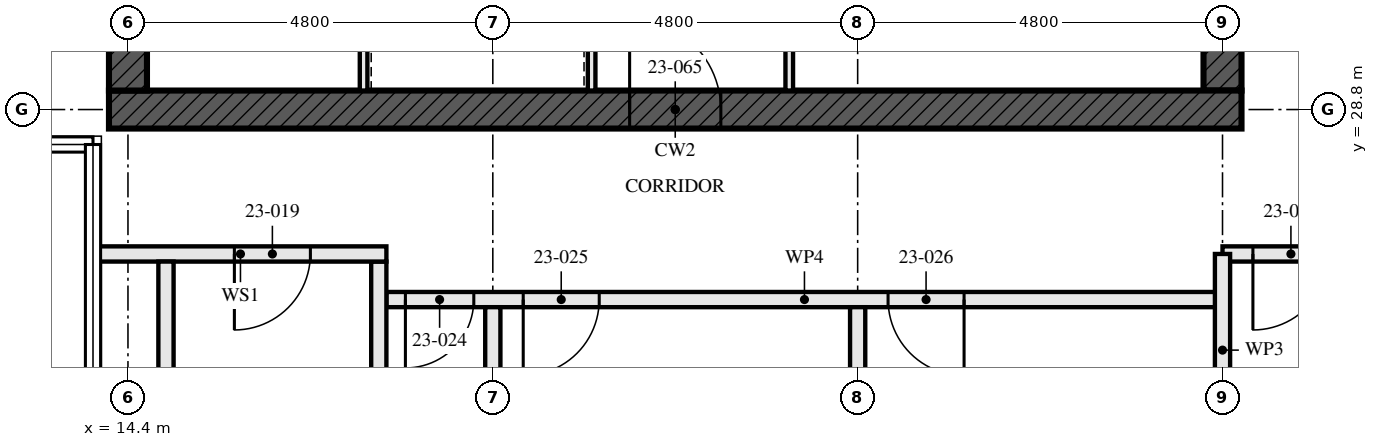
"""IFC4 building model, lengths in metres.
Left out: names, types, materials, properties, quantities, classifications, styles, units other than length and angle.
Written with IfcOpenShell. Run it as: python <this file> out.ifc"""

import sys

from ifc_helpers import new_model, si_unit, direction, frame, frame_2d, origin, place, context, subcontext, project, spatial, rectangle, extrude, element, fill, save


model = new_model("IFC4")
c1 = context("Model", 3, precision=1e-05, world=origin(), true_north=direction((0.0, 1.0)))
c2 = subcontext(c1, "Body", "Model", "MODEL_VIEW")
j1 = project(units=[si_unit("LENGTHUNIT", "METRE"), si_unit("PLANEANGLEUNIT", "RADIAN")], contexts=[c1])
p1 = place(None, origin())
s1 = spatial("IfcSite", under=j1, at=p1, CompositionType="ELEMENT")
p2 = place(p1, origin())
s2 = spatial("IfcBuilding", under=s1, at=p2, CompositionType="ELEMENT")
p3 = place(p2, frame((0.0, 0.0, 87.5)))
s3 = spatial("IfcBuildingStorey", under=s2, at=p3, CompositionType="ELEMENT", Elevation=87.5)
p4 = place(p3, frame((14.15, 28.8, -0.17), z_axis=(0.0, 0.0, 1.0), x_axis=(1.0, 0.0, 0.0)))
e1 = element("IfcWall", 1, at=p4, inside=s3, PredefinedType="SHEAR", context=c2, shape_type="SweptSolid", body=[
    extrude(rectangle(XDim=14.9, YDim=0.5, at=frame_2d((7.45, 0.0))), origin(), (0.0, 0.0, 1.0), 3.5),
])
p5 = place(p4, frame((6.85, 0.0, 0.17)))
e2 = element("IfcOpeningElement", 2, at=p5, cuts=e1, PredefinedType="OPENING", context=c2, shape_type="SweptSolid", body=[
    extrude(rectangle(XDim=1.2, YDim=2.1, at=frame_2d((0.6, 1.05))), frame((0.0, 0.26, 0.0), z_axis=(0.0, -1.0, 0.0), x_axis=(1.0, 0.0, 0.0)), (0.0, 0.0, 1.0), 0.521),
])
p6 = place(p3, frame((14.4, 42.95, -0.17), z_axis=(0.0, 0.0, 1.0), x_axis=(0.0, -1.0, 0.0)))
e3 = element("IfcWall", 3, at=p6, inside=s3, PredefinedType="SHEAR", context=c2, shape_type="SweptSolid", body=[
    extrude(rectangle(XDim=13.9, YDim=0.5, at=frame_2d((6.95, 0.0))), origin(), (0.0, 0.0, 1.0), 3.5),
])
p7 = place(p6, frame((6.35, 0.0, 0.17)))
e4 = element("IfcOpeningElement", 4, at=p7, cuts=e3, PredefinedType="OPENING", context=c2, shape_type="SweptSolid", body=[
    extrude(rectangle(XDim=1.2, YDim=2.1, at=frame_2d((0.6, 1.05))), frame((0.0, 0.26, 0.0), z_axis=(0.0, -1.0, 0.0), x_axis=(1.0, 0.0, 0.0)), (0.0, 0.0, 1.0), 0.521),
])
p8 = place(p3, frame((28.8, 29.05, -0.17), z_axis=(0.0, 0.0, 1.0), x_axis=(0.0, 1.0, 0.0)))
e5 = element("IfcWall", 5, at=p8, inside=s3, PredefinedType="SHEAR", context=c2, shape_type="SweptSolid", body=[
    extrude(rectangle(XDim=13.9, YDim=0.5, at=frame_2d((6.95, 0.0))), origin(), (0.0, 0.0, 1.0), 3.5),
])
p9 = place(p8, frame((6.35, 0.0, 0.17)))
e6 = element("IfcOpeningElement", 6, at=p9, cuts=e5, PredefinedType="OPENING", context=c2, shape_type="SweptSolid", body=[
    extrude(rectangle(XDim=1.2, YDim=2.1, at=frame_2d((0.6, 1.05))), frame((0.0, 0.26, 0.0), z_axis=(0.0, -1.0, 0.0), x_axis=(1.0, 0.0, 0.0)), (0.0, 0.0, 1.0), 0.521),
])
for number, where, z_axis, x_axis in (
    (7, (14.9, 22.1, 0.0), (0.0, 0.0, 1.0), (0.0, 1.0, 0.0)),
    (8, (17.7, 22.1, 0.0), (0.0, 0.0, 1.0), (0.0, 1.0, 0.0)),
):
    element("IfcWall", number, at=place(p3, frame(where, z_axis=z_axis, x_axis=x_axis)), inside=s3, PredefinedType="SOLIDWALL", context=c2, shape_type="SweptSolid", body=[
        extrude(rectangle(XDim=4.7, YDim=0.2, at=frame_2d((2.35, 0.0))), origin(), (0.0, 0.0, 1.0), 2.99),
    ])
p10 = place(p3, frame((13.96, 26.9, 0.0), z_axis=(0.0, 0.0, 1.0), x_axis=(1.0, 0.0, 0.0)))
e9 = element("IfcWall", 9, at=p10, inside=s3, PredefinedType="SOLIDWALL", context=c2, shape_type="SweptSolid", body=[
    extrude(rectangle(XDim=3.84, YDim=0.2, at=frame_2d((1.92, 0.0))), origin(), (0.0, 0.0, 1.0), 2.32),
])
p11 = place(p10, frame((1.84, 0.0, 0.0)))
e10 = element("IfcOpeningElement", 10, at=p11, cuts=e9, PredefinedType="OPENING", context=c2, shape_type="SweptSolid", body=[
    extrude(rectangle(XDim=1.0, YDim=2.1, at=frame_2d((0.5, 1.05))), frame((0.0, 0.111, 0.0), z_axis=(0.0, -1.0, 0.0), x_axis=(1.0, 0.0, 0.0)), (0.0, 0.0, 1.0), 0.221),
])
p12 = place(p3, frame((19.2, 19.545, 0.0), z_axis=(0.0, 0.0, 1.0), x_axis=(0.0, 1.0, 0.0)))
e11 = element("IfcWall", 11, at=p12, inside=s3, PredefinedType="PARTITIONING", context=c2, shape_type="SweptSolid", body=[
    extrude(rectangle(XDim=6.655, YDim=0.2, at=frame_2d((3.328, 0.0))), origin(), (0.0, 0.0, 1.0), 2.55),
])
p13 = place(p3, frame((24.0, 14.745, 0.0), z_axis=(0.0, 0.0, 1.0), x_axis=(0.0, 1.0, 0.0)))
e12 = element("IfcWall", 12, at=p13, inside=s3, PredefinedType="PARTITIONING", context=c2, shape_type="SweptSolid", body=[
    extrude(rectangle(XDim=11.455, YDim=0.2, at=frame_2d((5.728, 0.0))), origin(), (0.0, 0.0, 1.0), 2.55),
])
p14 = place(p3, frame((17.8, 26.3, 0.0), z_axis=(0.0, 0.0, 1.0), x_axis=(1.0, 0.0, 0.0)))
e13 = element("IfcWall", 13, at=p14, inside=s3, PredefinedType="PARTITIONING", context=c2, shape_type="SweptSolid", body=[
    extrude(rectangle(XDim=11.0, YDim=0.2, at=frame_2d((5.5, 0.0))), origin(), (0.0, 0.0, 1.0), 2.55),
])
p15 = place(p14, frame((0.25, 0.0, 0.0)))
e14 = element("IfcOpeningElement", 14, at=p15, cuts=e13, PredefinedType="OPENING", context=c2, shape_type="SweptSolid", body=[
    extrude(rectangle(XDim=0.9, YDim=2.1, at=frame_2d((0.45, 1.05))), frame((0.0, 0.111, 0.0), z_axis=(0.0, -1.0, 0.0), x_axis=(1.0, 0.0, 0.0)), (0.0, 0.0, 1.0), 0.221),
])
p16 = place(p14, frame((1.8, 0.0, 0.0)))
e15 = element("IfcOpeningElement", 15, at=p16, cuts=e13, PredefinedType="OPENING", context=c2, shape_type="SweptSolid", body=[
    extrude(rectangle(XDim=1.0, YDim=2.1, at=frame_2d((0.5, 1.05))), frame((0.0, 0.111, 0.0), z_axis=(0.0, -1.0, 0.0), x_axis=(1.0, 0.0, 0.0)), (0.0, 0.0, 1.0), 0.221),
])
p17 = place(p14, frame((6.6, 0.0, 0.0)))
e16 = element("IfcOpeningElement", 16, at=p17, cuts=e13, PredefinedType="OPENING", context=c2, shape_type="SweptSolid", body=[
    extrude(rectangle(XDim=1.0, YDim=2.1, at=frame_2d((0.5, 1.05))), frame((0.0, 0.111, 0.0), z_axis=(0.0, -1.0, 0.0), x_axis=(1.0, 0.0, 0.0)), (0.0, 0.0, 1.0), 0.221),
])
p18 = place(p3, frame((28.8, 26.9, 0.0), z_axis=(0.0, 0.0, 1.0), x_axis=(1.0, 0.0, 0.0)))
e17 = element("IfcWall", 17, at=p18, inside=s3, PredefinedType="PARTITIONING", context=c2, shape_type="SweptSolid", body=[
    extrude(rectangle(XDim=9.6, YDim=0.2, at=frame_2d((4.8, 0.0))), origin(), (0.0, 0.0, 1.0), 3.33),
])
p19 = place(p18, frame((0.4, 0.0, 0.0)))
e18 = element("IfcOpeningElement", 18, at=p19, cuts=e17, PredefinedType="OPENING", context=c2, shape_type="SweptSolid", body=[
    extrude(rectangle(XDim=1.0, YDim=2.1, at=frame_2d((0.5, 1.05))), frame((0.0, 0.111, 0.0), z_axis=(0.0, -1.0, 0.0), x_axis=(1.0, 0.0, 0.0)), (0.0, 0.0, 1.0), 0.221),
])
p20 = place(p18, frame((5.2, 0.0, 0.0)))
e19 = element("IfcOpeningElement", 19, at=p20, cuts=e17, PredefinedType="OPENING", context=c2, shape_type="SweptSolid", body=[
    extrude(rectangle(XDim=1.0, YDim=2.1, at=frame_2d((0.5, 1.05))), frame((0.0, 0.111, 0.0), z_axis=(0.0, -1.0, 0.0), x_axis=(1.0, 0.0, 0.0)), (0.0, 0.0, 1.0), 0.221),
])
p21 = place(p3, frame((20.5, 29.05, 0.0), z_axis=(0.0, 0.0, 1.0), x_axis=(0.0, 1.0, 0.0)))
e20 = element("IfcWall", 20, at=p21, inside=s3, PredefinedType="SOLIDWALL", context=c2, shape_type="SweptSolid", body=[
    extrude(rectangle(XDim=5.8, YDim=0.1, at=frame_2d((2.9, 0.0))), origin(), (0.0, 0.0, 1.0), 3.33),
])
p22 = place(p21, frame((0.8, 0.0, 0.0)))
e21 = element("IfcOpeningElement", 21, at=p22, cuts=e20, PredefinedType="OPENING", context=c2, shape_type="SweptSolid", body=[
    extrude(rectangle(XDim=1.1, YDim=2.3, at=frame_2d((0.55, 1.15))), frame((0.0, 0.061, 0.0), z_axis=(0.0, -1.0, 0.0), x_axis=(1.0, 0.0, 0.0)), (0.0, 0.0, 1.0), 0.121),
])
p23 = place(p21, frame((3.775, 0.0, 0.0)))
e22 = element("IfcOpeningElement", 22, at=p23, cuts=e20, PredefinedType="OPENING", context=c2, shape_type="SweptSolid", body=[
    extrude(rectangle(XDim=1.1, YDim=2.3, at=frame_2d((0.55, 1.15))), frame((0.0, 0.061, 0.0), z_axis=(0.0, -1.0, 0.0), x_axis=(1.0, 0.0, 0.0)), (0.0, 0.0, 1.0), 0.121),
])
p24 = place(p3, frame((23.1, 29.05, 0.0), z_axis=(0.0, 0.0, 1.0), x_axis=(0.0, 1.0, 0.0)))
e23 = element("IfcWall", 23, at=p24, inside=s3, PredefinedType="SOLIDWALL", context=c2, shape_type="SweptSolid", body=[
    extrude(rectangle(XDim=5.8, YDim=0.1, at=frame_2d((2.9, 0.0))), origin(), (0.0, 0.0, 1.0), 3.33),
])
p25 = place(p24, frame((1.0, 0.0, 0.0)))
e24 = element("IfcOpeningElement", 24, at=p25, cuts=e23, PredefinedType="OPENING", context=c2, shape_type="SweptSolid", body=[
    extrude(rectangle(XDim=0.7, YDim=2.1, at=frame_2d((0.35, 1.05))), frame((0.0, 0.061, 0.0), z_axis=(0.0, -1.0, 0.0), x_axis=(1.0, 0.0, 0.0)), (0.0, 0.0, 1.0), 0.121),
])
p26 = place(p3, frame((17.5, 29.05, 0.0), z_axis=(0.0, 0.0, 1.0), x_axis=(0.0, 1.0, 0.0)))
e25 = element("IfcWall", 25, at=p26, inside=s3, PredefinedType="SOLIDWALL", context=c2, shape_type="SweptSolid", body=[
    extrude(rectangle(XDim=5.8, YDim=0.1, at=frame_2d((2.9, 0.0))), origin(), (0.0, 0.0, 1.0), 3.33),
])
p27 = place(p3, frame((28.8, 24.37, 0.0), z_axis=(0.0, 0.0, 1.0), x_axis=(0.0, 1.0, 0.0)))
e26 = element("IfcWall", 26, at=p27, inside=s3, PredefinedType="PARTITIONING", context=c2, shape_type="SweptSolid", body=[
    extrude(rectangle(XDim=2.53, YDim=0.2, at=frame_2d((1.265, 0.0))), origin(), (0.0, 0.0, 1.0), 2.32),
])
p28 = place(p11, frame((1.0, 0.0, 0.0), z_axis=(0.0, 0.0, 1.0), x_axis=(-1.0, 0.0, 0.0)))
e27 = element("IfcDoor", 27, at=p28, inside=s3, OperationType="SINGLE_SWING_LEFT", PredefinedType="DOOR", context=c2, shape_type="SweptSolid", body=[
    extrude(rectangle(XDim=1.0, YDim=2.1, at=frame_2d((0.5, 1.05))), frame((0.0, 0.032, 0.0), z_axis=(0.0, -1.0, 0.0), x_axis=(1.0, 0.0, 0.0)), (0.0, 0.0, 1.0), 0.064),
])
fill(e10, e27)
p29 = place(p15, frame((0.9, 0.0, 0.0), z_axis=(0.0, 0.0, 1.0), x_axis=(-1.0, 0.0, 0.0)))
e28 = element("IfcDoor", 28, at=p29, inside=s3, OperationType="SINGLE_SWING_LEFT", PredefinedType="DOOR", context=c2, shape_type="SweptSolid", body=[
    extrude(rectangle(XDim=0.9, YDim=2.1, at=frame_2d((0.45, 1.05))), frame((0.0, 0.027, 0.0), z_axis=(0.0, -1.0, 0.0), x_axis=(1.0, 0.0, 0.0)), (0.0, 0.0, 1.0), 0.054),
])
fill(e14, e28)
p30 = place(p16, frame((1.0, 0.0, 0.0), z_axis=(0.0, 0.0, 1.0), x_axis=(-1.0, 0.0, 0.0)))
e29 = element("IfcDoor", 29, at=p30, inside=s3, OperationType="SINGLE_SWING_LEFT", PredefinedType="DOOR", context=c2, shape_type="SweptSolid", body=[
    extrude(rectangle(XDim=1.0, YDim=2.1, at=frame_2d((0.5, 1.05))), frame((0.0, 0.027, 0.0), z_axis=(0.0, -1.0, 0.0), x_axis=(1.0, 0.0, 0.0)), (0.0, 0.0, 1.0), 0.054),
])
fill(e15, e29)
p31 = place(p17, frame((1.0, 0.0, 0.0), z_axis=(0.0, 0.0, 1.0), x_axis=(-1.0, 0.0, 0.0)))
e30 = element("IfcDoor", 30, at=p31, inside=s3, OperationType="SINGLE_SWING_RIGHT", PredefinedType="DOOR", context=c2, shape_type="SweptSolid", body=[
    extrude(rectangle(XDim=1.0, YDim=2.1, at=frame_2d((0.5, 1.05))), frame((0.0, 0.027, 0.0), z_axis=(0.0, -1.0, 0.0), x_axis=(1.0, 0.0, 0.0)), (0.0, 0.0, 1.0), 0.054),
])
fill(e16, e30)
p32 = place(p19, frame((1.0, 0.0, 0.0), z_axis=(0.0, 0.0, 1.0), x_axis=(-1.0, 0.0, 0.0)))
e31 = element("IfcDoor", 31, at=p32, inside=s3, OperationType="SINGLE_SWING_LEFT", PredefinedType="DOOR", context=c2, shape_type="SweptSolid", body=[
    extrude(rectangle(XDim=1.0, YDim=2.1, at=frame_2d((0.5, 1.05))), frame((0.0, 0.027, 0.0), z_axis=(0.0, -1.0, 0.0), x_axis=(1.0, 0.0, 0.0)), (0.0, 0.0, 1.0), 0.054),
])
fill(e18, e31)
p33 = place(p5, origin())
e32 = element("IfcDoor", 32, at=p33, inside=s3, OperationType="SINGLE_SWING_LEFT", PredefinedType="DOOR", context=c2, shape_type="SweptSolid", body=[
    extrude(rectangle(XDim=1.2, YDim=2.1, at=frame_2d((0.6, 1.05))), frame((0.0, 0.027, 0.0), z_axis=(0.0, -1.0, 0.0), x_axis=(1.0, 0.0, 0.0)), (0.0, 0.0, 1.0), 0.054),
])
fill(e2, e32)
save(model, sys.argv[1])
